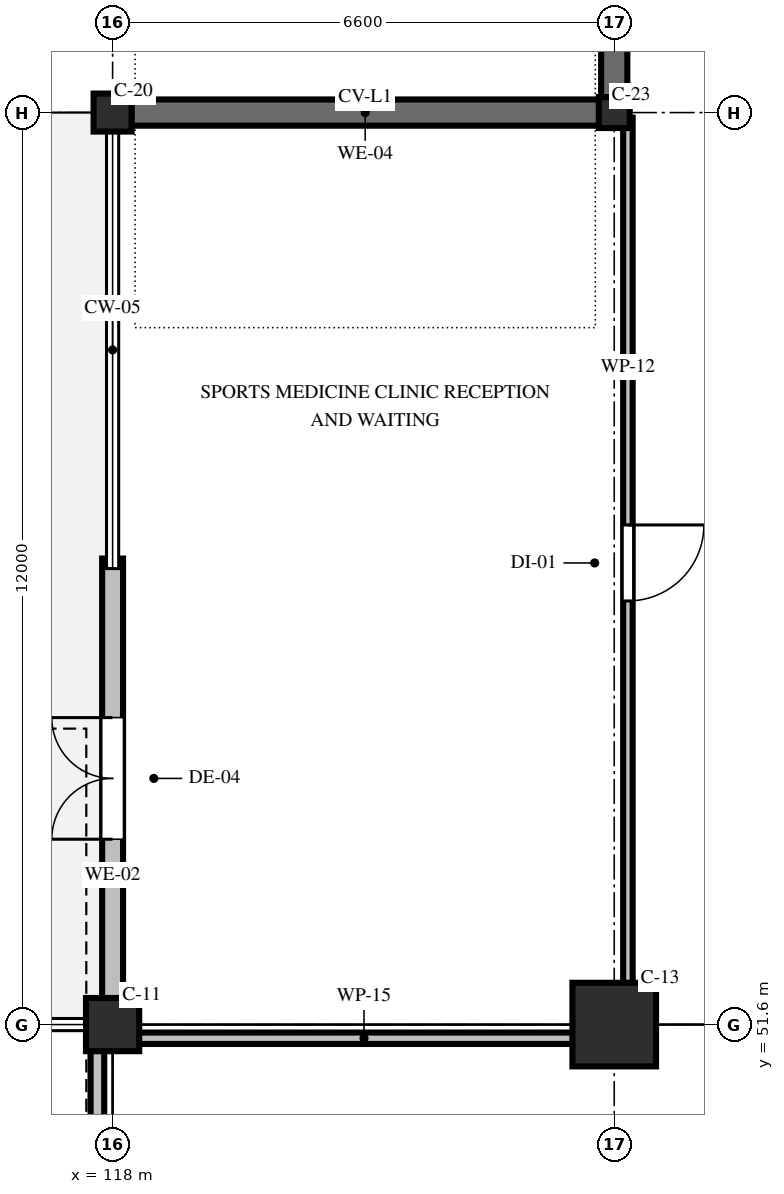
"""IFC4 building model, lengths in metres.
Left out: names, types, materials, properties, quantities, classifications, styles, units other than length and angle.
Written with IfcOpenShell. Run it as: python <this file> out.ifc"""

import sys

from ifc_helpers import new_model, si_unit, direction, frame, frame_2d, origin, origin_2d, place, context, subcontext, project, spatial, rectangle, hollow_rectangle, circle, hollow_circle, extrude, element, fill, save


model = new_model("IFC4")
c1 = context("Model", 3, precision=1e-05, world=origin(), true_north=direction((0.0, 1.0)))
c2 = subcontext(c1, "Body", "Model", "MODEL_VIEW")
j1 = project(units=[si_unit("LENGTHUNIT", "METRE"), si_unit("PLANEANGLEUNIT", "RADIAN")], contexts=[c1])
p1 = place(None, origin())
s1 = spatial("IfcSite", under=j1, at=p1, CompositionType="ELEMENT")
p2 = place(p1, origin())
s2 = spatial("IfcBuilding", under=s1, at=p2, CompositionType="ELEMENT")
p3 = place(p2, origin())
s3 = spatial("IfcBuildingStorey", under=s2, at=p3, CompositionType="ELEMENT", Elevation=0.0)
p4 = place(p3, frame((118.0, 51.6, 0.0), z_axis=(0.0, 0.0, 1.0), x_axis=(1.0, 0.0, 0.0)))
e1 = element("IfcColumn", 1, at=p4, inside=s3, PredefinedType="COLUMN", context=c2, shape_type="SweptSolid", body=[
    extrude(circle(Radius=0.35, at=origin_2d()), origin(), (0.0, 0.0, 1.0), 5.4),
])
p5 = place(p3, frame((118.0, 63.6, 0.0), z_axis=(0.0, 0.0, 1.0), x_axis=(1.0, 0.0, 0.0)))
e2 = element("IfcColumn", 2, at=p5, inside=s3, PredefinedType="COLUMN", context=c2, shape_type="SweptSolid", body=[
    extrude(hollow_rectangle(XDim=0.5, YDim=0.5, WallThickness=0.022, InnerFilletRadius=0.022, OuterFilletRadius=0.044, at=origin_2d()), origin(), (0.0, 0.0, 1.0), 5.4),
])
p6 = place(p3, frame((124.6, 51.6, 0.0), z_axis=(0.0, 0.0, 1.0), x_axis=(1.0, 0.0, 0.0)))
e3 = element("IfcColumn", 3, at=p6, inside=s3, PredefinedType="COLUMN", context=c2, shape_type="SweptSolid", body=[
    extrude(circle(Radius=0.55, at=origin_2d()), origin(), (0.0, 0.0, 1.0), 5.4),
])
p7 = place(p3, frame((124.6, 63.6, 0.0), z_axis=(0.0, 0.0, 1.0), x_axis=(1.0, 0.0, 0.0)))
e4 = element("IfcColumn", 4, at=p7, inside=s3, PredefinedType="COLUMN", context=c2, shape_type="SweptSolid", body=[
    extrude(hollow_circle(Radius=0.203, WallThickness=0.016, at=origin_2d()), origin(), (0.0, 0.0, 1.0), 5.4),
])
p8 = place(p3, frame((118.0, 51.946, 0.0), z_axis=(0.0, 0.0, 1.0), x_axis=(0.0, 1.0, 0.0)))
e5 = element("IfcWall", 5, at=p8, inside=s3, PredefinedType="SOLIDWALL", context=c2, shape_type="SweptSolid", body=[
    extrude(rectangle(XDim=5.786, YDim=0.275, at=frame_2d((2.893, 0.0))), origin(), (0.0, 0.0, 1.0), 4.268),
])
p9 = place(p8, frame((2.093, 0.0, 0.0)))
e6 = element("IfcOpeningElement", 6, at=p9, cuts=e5, PredefinedType="OPENING", context=c2, shape_type="SweptSolid", body=[
    extrude(rectangle(XDim=1.6, YDim=2.2, at=frame_2d((0.8, 1.1))), frame((0.0, 0.147, 0.0), z_axis=(0.0, -1.0, 0.0), x_axis=(1.0, 0.0, 0.0)), (0.0, 0.0, 1.0), 0.295),
])
p10 = place(p3, frame((118.246, 63.6, 0.0), z_axis=(0.0, 0.0, 1.0), x_axis=(1.0, 0.0, 0.0)))
e7 = element("IfcWall", 7, at=p10, inside=s3, PredefinedType="SOLIDWALL", context=c2, shape_type="SweptSolid", body=[
    extrude(rectangle(XDim=6.155, YDim=0.345, at=frame_2d((3.077, 0.0))), origin(), (0.0, 0.0, 1.0), 4.268),
])
p11 = place(p3, frame((124.6, 63.799, 0.0), z_axis=(0.0, 0.0, 1.0), x_axis=(0.0, 1.0, 0.0)))
e8 = element("IfcWall", 8, at=p11, inside=s3, PredefinedType="SOLIDWALL", context=c2, shape_type="SweptSolid", body=[
    extrude(rectangle(XDim=5.966, YDim=0.345, at=frame_2d((2.983, 0.0))), origin(), (0.0, 0.0, 1.0), 4.276),
])
p12 = place(p3, frame((124.78, 63.532, 0.0), z_axis=(0.0, 0.0, 1.0), x_axis=(0.0, -1.0, 0.0)))
e9 = element("IfcWall", 9, at=p12, inside=s3, PredefinedType="PARTITIONING", context=c2, shape_type="SweptSolid", body=[
    extrude(rectangle(XDim=11.716, YDim=0.125, at=frame_2d((5.858, 0.0))), origin(), (0.0, 0.0, 1.0), 4.37),
])
p13 = place(p12, frame((5.358, 0.0, 0.0)))
e10 = element("IfcOpeningElement", 10, at=p13, cuts=e9, PredefinedType="OPENING", context=c2, shape_type="SweptSolid", body=[
    extrude(rectangle(XDim=1.0, YDim=2.15, at=frame_2d((0.5, 1.075))), frame((0.0, 0.073, 0.0), z_axis=(0.0, -1.0, 0.0), x_axis=(1.0, 0.0, 0.0)), (0.0, 0.0, 1.0), 0.145),
])
p14 = place(p3, frame((124.384, 51.42, 0.0), z_axis=(0.0, 0.0, 1.0), x_axis=(-1.0, 0.0, 0.0)))
e11 = element("IfcWall", 11, at=p14, inside=s3, PredefinedType="PARTITIONING", context=c2, shape_type="SweptSolid", body=[
    extrude(rectangle(XDim=6.152, YDim=0.15, at=frame_2d((3.076, 0.0))), origin(), (0.0, 0.0, 1.0), 4.278),
])
p15 = place(p3, frame((117.8, 51.368, 0.0), z_axis=(0.0, 0.0, 1.0), x_axis=(0.0, -1.0, 0.0)))
e12 = element("IfcWall", 12, at=p15, inside=s3, PredefinedType="PARTITIONING", context=c2, shape_type="SweptSolid", body=[
    extrude(rectangle(XDim=28.755, YDim=0.18, at=frame_2d((14.377, 0.0))), origin(), (0.0, 0.0, 1.0), 4.278),
])
p16 = place(p15, frame((13.577, 0.0, 0.0)))
e13 = element("IfcOpeningElement", 13, at=p16, cuts=e12, PredefinedType="OPENING", context=c2, shape_type="SweptSolid", body=[
    extrude(rectangle(XDim=1.6, YDim=2.2, at=frame_2d((0.8, 1.1))), frame((0.0, 0.1, 0.0), z_axis=(0.0, -1.0, 0.0), x_axis=(1.0, 0.0, 0.0)), (0.0, 0.0, 1.0), 0.2),
])
p17 = place(p9, origin())
e14 = element("IfcDoor", 14, at=p17, inside=s3, OperationType="DOUBLE_DOOR_SINGLE_SWING", PredefinedType="DOOR", context=c2, shape_type="SweptSolid", body=[
    extrude(rectangle(XDim=1.6, YDim=2.2, at=frame_2d((0.8, 1.1))), frame((0.0, 0.025, 0.0), z_axis=(0.0, -1.0, 0.0), x_axis=(1.0, 0.0, 0.0)), (0.0, 0.0, 1.0), 0.05),
])
fill(e6, e14)
p18 = place(p13, origin())
e15 = element("IfcDoor", 15, at=p18, inside=s3, OperationType="SINGLE_SWING_LEFT", PredefinedType="DOOR", context=c2, shape_type="SweptSolid", body=[
    extrude(rectangle(XDim=1.0, YDim=2.15, at=frame_2d((0.5, 1.075))), frame((0.0, 0.025, 0.0), z_axis=(0.0, -1.0, 0.0), x_axis=(1.0, 0.0, 0.0)), (0.0, 0.0, 1.0), 0.05),
])
fill(e10, e15)
save(model, sys.argv[1])
